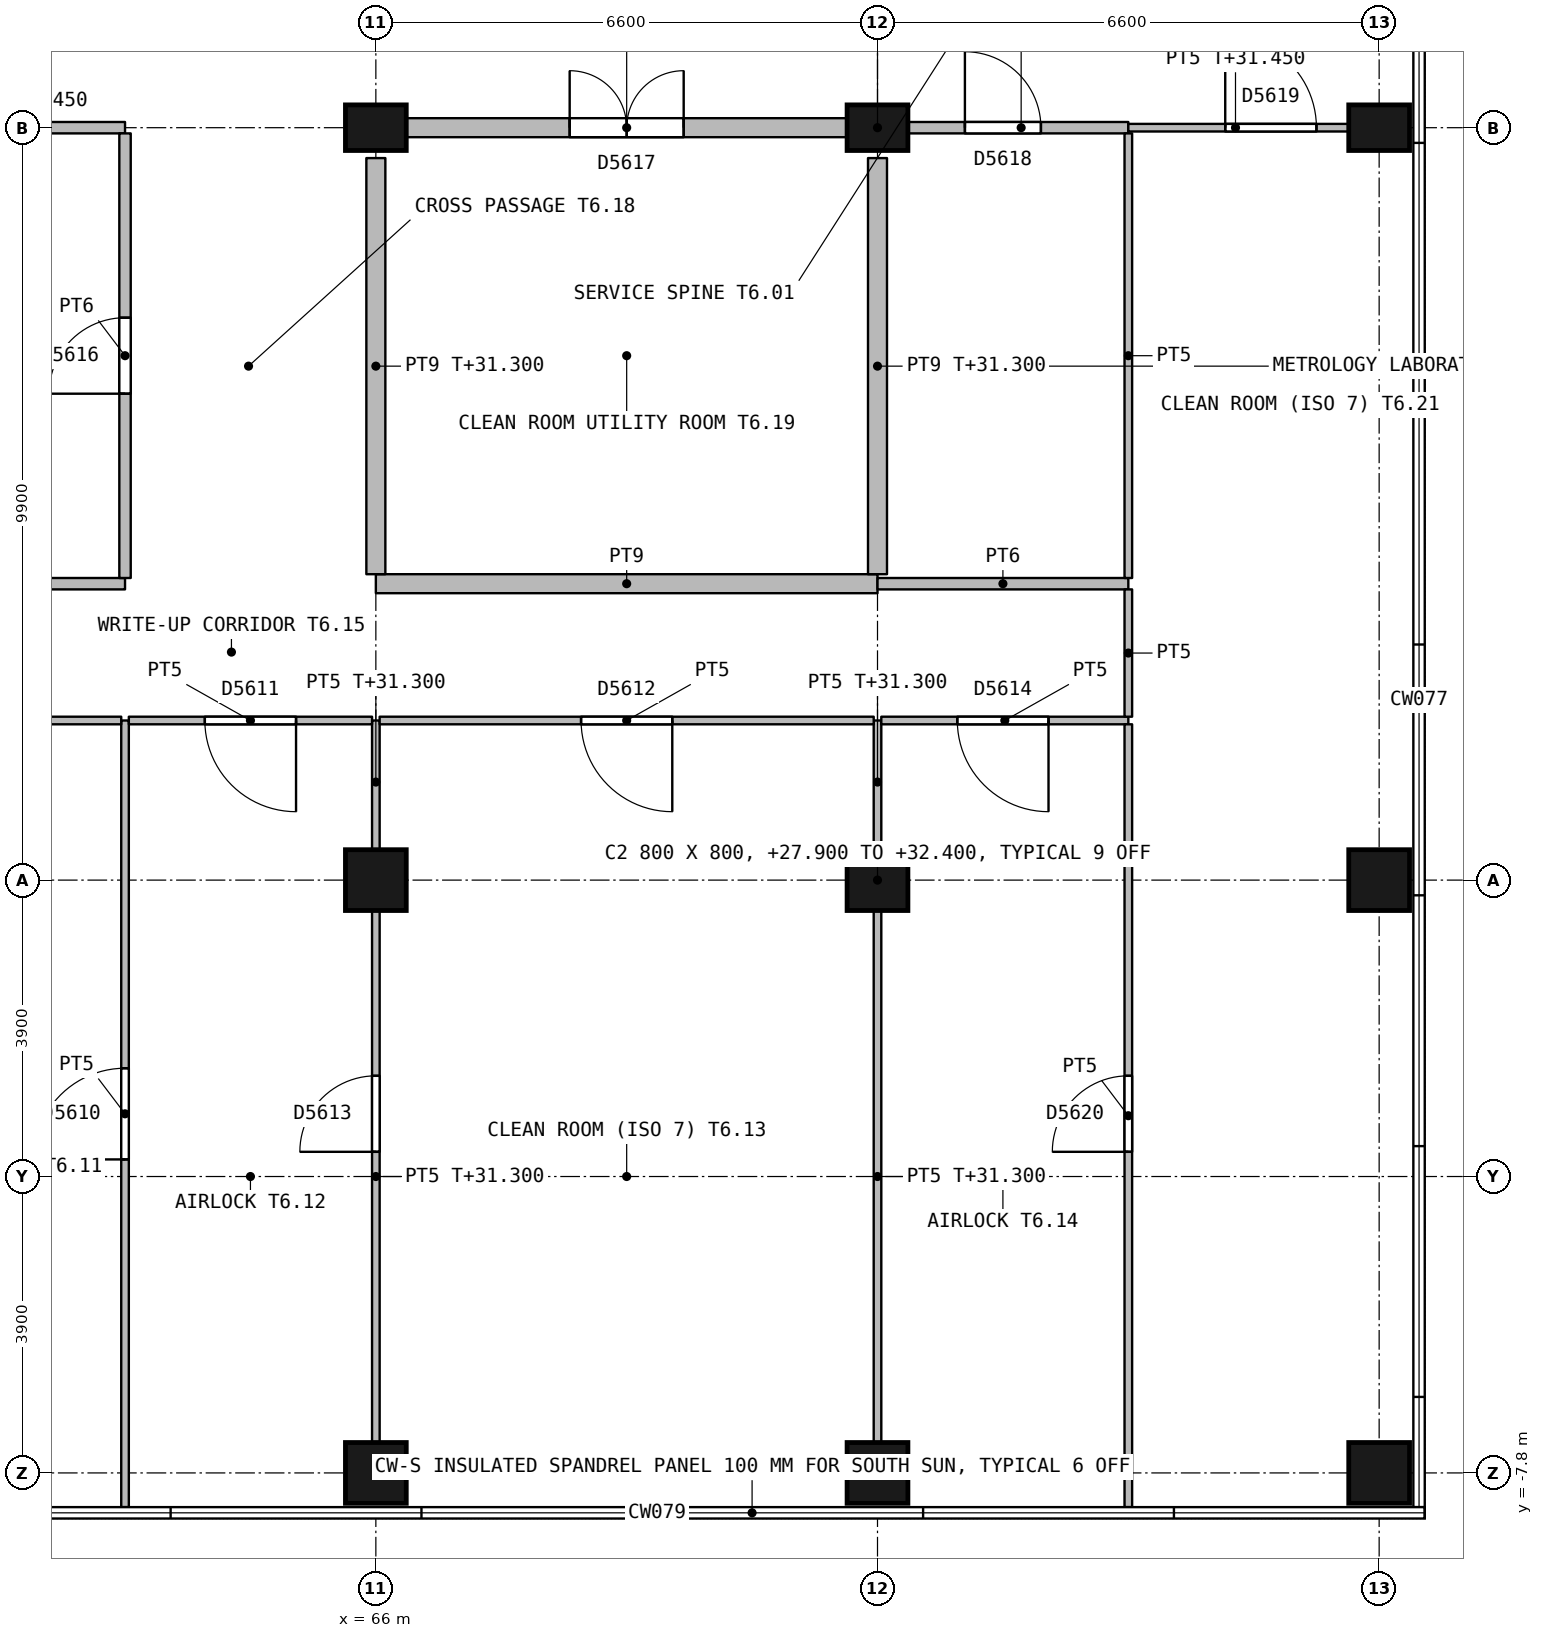
"""IFC4 building model, lengths in metres.
Left out: names, types, materials, properties, quantities, classifications, styles, units other than length and angle.
Written with IfcOpenShell. Run it as: python <this file> out.ifc"""

import sys

from ifc_helpers import new_model, si_unit, direction, frame, frame_2d, origin, origin_2d, place, context, subcontext, project, spatial, rectangle, extrude, element, fill, save


model = new_model("IFC4")
c1 = context("Model", 3, precision=1e-05, world=origin(), true_north=direction((0.0, 1.0)))
c2 = subcontext(c1, "Body", "Model", "MODEL_VIEW")
j1 = project(units=[si_unit("LENGTHUNIT", "METRE"), si_unit("PLANEANGLEUNIT", "RADIAN")], contexts=[c1])
p1 = place(None, origin())
s1 = spatial("IfcSite", under=j1, at=p1, CompositionType="ELEMENT")
p2 = place(p1, origin())
s2 = spatial("IfcBuilding", under=s1, at=p2, CompositionType="ELEMENT")
p3 = place(p2, frame((0.0, 0.0, 27.9)))
s3 = spatial("IfcBuildingStorey", under=s2, at=p3, CompositionType="ELEMENT", Elevation=27.9)
for number, where, z_axis, x_axis in (
    (1, (66.0, -7.8, 0.0), (0.0, 0.0, 1.0), (1.0, 0.0, 0.0)),
    (2, (66.0, 0.0, 0.0), (0.0, 0.0, 1.0), (1.0, 0.0, 0.0)),
):
    element("IfcColumn", number, at=place(p3, frame(where, z_axis=z_axis, x_axis=x_axis)), inside=s3, PredefinedType="COLUMN", context=c2, shape_type="SweptSolid", body=[
        extrude(rectangle(XDim=0.8, YDim=0.8, at=origin_2d()), origin(), (0.0, 0.0, 1.0), 4.5),
    ])
p4 = place(p3, frame((66.0, 9.9, 0.0), z_axis=(0.0, 0.0, 1.0), x_axis=(1.0, 0.0, 0.0)))
e3 = element("IfcColumn", 3, at=p4, inside=s3, PredefinedType="COLUMN", context=c2, shape_type="SweptSolid", body=[
    extrude(rectangle(XDim=0.8, YDim=0.6, at=origin_2d()), origin(), (0.0, 0.0, 1.0), 4.5),
])
for number, where, z_axis, x_axis in (
    (4, (72.6, -7.8, 0.0), (0.0, 0.0, 1.0), (1.0, 0.0, 0.0)),
    (5, (72.6, 0.0, 0.0), (0.0, 0.0, 1.0), (1.0, 0.0, 0.0)),
):
    element("IfcColumn", number, at=place(p3, frame(where, z_axis=z_axis, x_axis=x_axis)), inside=s3, PredefinedType="COLUMN", context=c2, shape_type="SweptSolid", body=[
        extrude(rectangle(XDim=0.8, YDim=0.8, at=origin_2d()), origin(), (0.0, 0.0, 1.0), 4.5),
    ])
p5 = place(p3, frame((72.6, 9.9, 0.0), z_axis=(0.0, 0.0, 1.0), x_axis=(1.0, 0.0, 0.0)))
e6 = element("IfcColumn", 6, at=p5, inside=s3, PredefinedType="COLUMN", context=c2, shape_type="SweptSolid", body=[
    extrude(rectangle(XDim=0.8, YDim=0.6, at=origin_2d()), origin(), (0.0, 0.0, 1.0), 4.5),
])
for number, where, z_axis, x_axis in (
    (7, (79.2, -7.8, 0.0), (0.0, 0.0, 1.0), (1.0, 0.0, 0.0)),
    (8, (79.2, 0.0, 0.0), (0.0, 0.0, 1.0), (1.0, 0.0, 0.0)),
):
    element("IfcColumn", number, at=place(p3, frame(where, z_axis=z_axis, x_axis=x_axis)), inside=s3, PredefinedType="COLUMN", context=c2, shape_type="SweptSolid", body=[
        extrude(rectangle(XDim=0.8, YDim=0.8, at=origin_2d()), origin(), (0.0, 0.0, 1.0), 4.5),
    ])
p6 = place(p3, frame((79.2, 9.9, 0.0), z_axis=(0.0, 0.0, 1.0), x_axis=(1.0, 0.0, 0.0)))
e9 = element("IfcColumn", 9, at=p6, inside=s3, PredefinedType="COLUMN", context=c2, shape_type="SweptSolid", body=[
    extrude(rectangle(XDim=0.8, YDim=0.6, at=origin_2d()), origin(), (0.0, 0.0, 1.0), 4.5),
])
p7 = place(p3, frame((59.8, 9.9, 0.0), z_axis=(0.0, 0.0, 1.0), x_axis=(1.0, 0.0, 0.0)))
e10 = element("IfcWall", 10, at=p7, inside=s3, PredefinedType="PARTITIONING", context=c2, shape_type="SweptSolid", body=[
    extrude(rectangle(XDim=2.9, YDim=0.15, at=frame_2d((1.45, 0.0))), origin(), (0.0, 0.0, 1.0), 3.55),
])
p8 = place(p3, frame((66.4, 9.9, 0.0), z_axis=(0.0, 0.0, 1.0), x_axis=(1.0, 0.0, 0.0)))
e11 = element("IfcWall", 11, at=p8, inside=s3, PredefinedType="PARTITIONING", context=c2, shape_type="SweptSolid", body=[
    extrude(rectangle(XDim=5.8, YDim=0.25, at=frame_2d((2.9, 0.0))), origin(), (0.0, 0.0, 1.0), 3.55),
])
p9 = place(p8, frame((2.15, 0.0, 0.0)))
e12 = element("IfcOpeningElement", 12, at=p9, cuts=e11, PredefinedType="OPENING", context=c2, shape_type="SweptSolid", body=[
    extrude(rectangle(XDim=1.5, YDim=2.1, at=frame_2d((0.75, 1.05))), frame((0.0, 0.135, 0.0), z_axis=(0.0, -1.0, 0.0), x_axis=(1.0, 0.0, 0.0)), (0.0, 0.0, 1.0), 0.27),
])
p10 = place(p3, frame((73.0, 9.9, 0.0), z_axis=(0.0, 0.0, 1.0), x_axis=(1.0, 0.0, 0.0)))
e13 = element("IfcWall", 13, at=p10, inside=s3, PredefinedType="PARTITIONING", context=c2, shape_type="SweptSolid", body=[
    extrude(rectangle(XDim=2.9, YDim=0.15, at=frame_2d((1.45, 0.0))), origin(), (0.0, 0.0, 1.0), 3.55),
])
p11 = place(p10, frame((0.75, 0.0, 0.0)))
e14 = element("IfcOpeningElement", 14, at=p11, cuts=e13, PredefinedType="OPENING", context=c2, shape_type="SweptSolid", body=[
    extrude(rectangle(XDim=1.0, YDim=2.1, at=frame_2d((0.5, 1.05))), frame((0.0, 0.085, 0.0), z_axis=(0.0, -1.0, 0.0), x_axis=(1.0, 0.0, 0.0)), (0.0, 0.0, 1.0), 0.17),
])
p12 = place(p3, frame((78.8, 9.9, 0.0), z_axis=(0.0, 0.0, 1.0), x_axis=(-1.0, 0.0, 0.0)))
e15 = element("IfcWall", 15, at=p12, inside=s3, PredefinedType="PARTITIONING", context=c2, shape_type="SweptSolid", body=[
    extrude(rectangle(XDim=2.9, YDim=0.1, at=frame_2d((1.45, 0.0))), origin(), (0.0, 0.0, 1.0), 3.55),
])
p13 = place(p12, frame((0.425, 0.0, 0.0)))
e16 = element("IfcOpeningElement", 16, at=p13, cuts=e15, PredefinedType="OPENING", context=c2, shape_type="SweptSolid", body=[
    extrude(rectangle(XDim=1.2, YDim=2.1, at=frame_2d((0.6, 1.05))), frame((0.0, 0.06, 0.0), z_axis=(0.0, -1.0, 0.0), x_axis=(1.0, 0.0, 0.0)), (0.0, 0.0, 1.0), 0.12),
])
p14 = place(p3, frame((62.7, 2.1, 0.0), z_axis=(0.0, 0.0, 1.0), x_axis=(0.0, -1.0, 0.0)))
e17 = element("IfcWall", 17, at=p14, inside=s3, PredefinedType="PARTITIONING", context=c2, shape_type="SweptSolid", body=[
    extrude(rectangle(XDim=10.35, YDim=0.1, at=frame_2d((5.175, 0.0))), origin(), (0.0, 0.0, 1.0), 4.2),
])
p15 = place(p14, frame((4.575, 0.0, 0.0)))
e18 = element("IfcOpeningElement", 18, at=p15, cuts=e17, PredefinedType="OPENING", context=c2, shape_type="SweptSolid", body=[
    extrude(rectangle(XDim=1.2, YDim=2.1, at=frame_2d((0.6, 1.05))), frame((0.0, 0.06, 0.0), z_axis=(0.0, -1.0, 0.0), x_axis=(1.0, 0.0, 0.0)), (0.0, 0.0, 1.0), 0.12),
])
p16 = place(p3, frame((62.65, 2.1, 0.0), z_axis=(0.0, 0.0, 1.0), x_axis=(-1.0, 0.0, 0.0)))
e19 = element("IfcWall", 19, at=p16, inside=s3, PredefinedType="PARTITIONING", context=c2, shape_type="SweptSolid", body=[
    extrude(rectangle(XDim=3.25, YDim=0.1, at=frame_2d((1.625, 0.0))), origin(), (0.0, 0.0, 1.0), 4.2),
])
p17 = place(p16, frame((1.1, 0.0, 0.0)))
e20 = element("IfcOpeningElement", 20, at=p17, cuts=e19, PredefinedType="OPENING", context=c2, shape_type="SweptSolid", body=[
    extrude(rectangle(XDim=1.0, YDim=2.1, at=frame_2d((0.5, 1.05))), frame((0.0, 0.06, 0.0), z_axis=(0.0, -1.0, 0.0), x_axis=(1.0, 0.0, 0.0)), (0.0, 0.0, 1.0), 0.12),
])
p18 = place(p3, frame((66.0, -0.4, 0.0), z_axis=(0.0, 0.0, 1.0), x_axis=(0.0, -1.0, 0.0)))
e21 = element("IfcWall", 21, at=p18, inside=s3, PredefinedType="PARTITIONING", context=c2, shape_type="SweptSolid", body=[
    extrude(rectangle(XDim=7.0, YDim=0.1, at=frame_2d((3.5, 0.0))), origin(), (0.0, 0.0, 1.0), 3.4),
])
p19 = place(p18, frame((2.175, 0.0, 0.0)))
e22 = element("IfcOpeningElement", 22, at=p19, cuts=e21, PredefinedType="OPENING", context=c2, shape_type="SweptSolid", body=[
    extrude(rectangle(XDim=1.0, YDim=2.1, at=frame_2d((0.5, 1.05))), frame((0.0, 0.06, 0.0), z_axis=(0.0, -1.0, 0.0), x_axis=(1.0, 0.0, 0.0)), (0.0, 0.0, 1.0), 0.12),
])
p20 = place(p3, frame((66.0, 0.4, 0.0), z_axis=(0.0, 0.0, 1.0), x_axis=(0.0, 1.0, 0.0)))
e23 = element("IfcWall", 23, at=p20, inside=s3, PredefinedType="PARTITIONING", context=c2, shape_type="SweptSolid", body=[
    extrude(rectangle(XDim=1.7, YDim=0.1, at=frame_2d((0.85, 0.0))), origin(), (0.0, 0.0, 1.0), 3.4),
])
p21 = place(p3, frame((65.95, 2.1, 0.0), z_axis=(0.0, 0.0, 1.0), x_axis=(-1.0, 0.0, 0.0)))
e24 = element("IfcWall", 24, at=p21, inside=s3, PredefinedType="PARTITIONING", context=c2, shape_type="SweptSolid", body=[
    extrude(rectangle(XDim=3.2, YDim=0.1, at=frame_2d((1.6, 0.0))), origin(), (0.0, 0.0, 1.0), 4.2),
])
p22 = place(p21, frame((1.0, 0.0, 0.0)))
e25 = element("IfcOpeningElement", 25, at=p22, cuts=e24, PredefinedType="OPENING", context=c2, shape_type="SweptSolid", body=[
    extrude(rectangle(XDim=1.2, YDim=2.1, at=frame_2d((0.6, 1.05))), frame((0.0, 0.06, 0.0), z_axis=(0.0, -1.0, 0.0), x_axis=(1.0, 0.0, 0.0)), (0.0, 0.0, 1.0), 0.12),
])
p23 = place(p3, frame((72.6, -7.4, 0.0), z_axis=(0.0, 0.0, 1.0), x_axis=(0.0, 1.0, 0.0)))
e26 = element("IfcWall", 26, at=p23, inside=s3, PredefinedType="PARTITIONING", context=c2, shape_type="SweptSolid", body=[
    extrude(rectangle(XDim=7.0, YDim=0.1, at=frame_2d((3.5, 0.0))), origin(), (0.0, 0.0, 1.0), 3.4),
])
p24 = place(p3, frame((72.6, 0.4, 0.0), z_axis=(0.0, 0.0, 1.0), x_axis=(0.0, 1.0, 0.0)))
e27 = element("IfcWall", 27, at=p24, inside=s3, PredefinedType="PARTITIONING", context=c2, shape_type="SweptSolid", body=[
    extrude(rectangle(XDim=1.7, YDim=0.1, at=frame_2d((0.85, 0.0))), origin(), (0.0, 0.0, 1.0), 3.4),
])
p25 = place(p3, frame((72.55, 2.1, 0.0), z_axis=(0.0, 0.0, 1.0), x_axis=(-1.0, 0.0, 0.0)))
e28 = element("IfcWall", 28, at=p25, inside=s3, PredefinedType="PARTITIONING", context=c2, shape_type="SweptSolid", body=[
    extrude(rectangle(XDim=6.5, YDim=0.1, at=frame_2d((3.25, 0.0))), origin(), (0.0, 0.0, 1.0), 4.2),
])
p26 = place(p25, frame((2.65, 0.0, 0.0)))
e29 = element("IfcOpeningElement", 29, at=p26, cuts=e28, PredefinedType="OPENING", context=c2, shape_type="SweptSolid", body=[
    extrude(rectangle(XDim=1.2, YDim=2.1, at=frame_2d((0.6, 1.05))), frame((0.0, 0.06, 0.0), z_axis=(0.0, -1.0, 0.0), x_axis=(1.0, 0.0, 0.0)), (0.0, 0.0, 1.0), 0.12),
])
p27 = place(p3, frame((75.9, 2.1, 0.0), z_axis=(0.0, 0.0, 1.0), x_axis=(-1.0, 0.0, 0.0)))
e30 = element("IfcWall", 30, at=p27, inside=s3, PredefinedType="PARTITIONING", context=c2, shape_type="SweptSolid", body=[
    extrude(rectangle(XDim=3.25, YDim=0.1, at=frame_2d((1.625, 0.0))), origin(), (0.0, 0.0, 1.0), 4.2),
])
p28 = place(p27, frame((1.05, 0.0, 0.0)))
e31 = element("IfcOpeningElement", 31, at=p28, cuts=e30, PredefinedType="OPENING", context=c2, shape_type="SweptSolid", body=[
    extrude(rectangle(XDim=1.2, YDim=2.1, at=frame_2d((0.6, 1.05))), frame((0.0, 0.06, 0.0), z_axis=(0.0, -1.0, 0.0), x_axis=(1.0, 0.0, 0.0)), (0.0, 0.0, 1.0), 0.12),
])
p29 = place(p3, frame((75.9, 2.05, 0.0), z_axis=(0.0, 0.0, 1.0), x_axis=(0.0, -1.0, 0.0)))
e32 = element("IfcWall", 32, at=p29, inside=s3, PredefinedType="PARTITIONING", context=c2, shape_type="SweptSolid", body=[
    extrude(rectangle(XDim=10.3, YDim=0.1, at=frame_2d((5.15, 0.0))), origin(), (0.0, 0.0, 1.0), 4.2),
])
p30 = place(p29, frame((4.625, 0.0, 0.0)))
e33 = element("IfcOpeningElement", 33, at=p30, cuts=e32, PredefinedType="OPENING", context=c2, shape_type="SweptSolid", body=[
    extrude(rectangle(XDim=1.0, YDim=2.1, at=frame_2d((0.5, 1.05))), frame((0.0, 0.06, 0.0), z_axis=(0.0, -1.0, 0.0), x_axis=(1.0, 0.0, 0.0)), (0.0, 0.0, 1.0), 0.12),
])
p31 = place(p3, frame((62.7, 3.9, 0.0), z_axis=(0.0, 0.0, 1.0), x_axis=(-1.0, 0.0, 0.0)))
e34 = element("IfcWall", 34, at=p31, inside=s3, PredefinedType="PARTITIONING", context=c2, shape_type="SweptSolid", body=[
    extrude(rectangle(XDim=3.3, YDim=0.15, at=frame_2d((1.65, 0.0))), origin(), (0.0, 0.0, 1.0), 4.2),
])
p32 = place(p3, frame((72.6, 3.9, 0.0), z_axis=(0.0, 0.0, 1.0), x_axis=(-1.0, 0.0, 0.0)))
e35 = element("IfcWall", 35, at=p32, inside=s3, PredefinedType="PARTITIONING", context=c2, shape_type="SweptSolid", body=[
    extrude(rectangle(XDim=6.6, YDim=0.25, at=frame_2d((3.3, 0.0))), origin(), (0.0, 0.0, 1.0), 4.2),
])
p33 = place(p3, frame((75.9, 3.9, 0.0), z_axis=(0.0, 0.0, 1.0), x_axis=(-1.0, 0.0, 0.0)))
e36 = element("IfcWall", 36, at=p33, inside=s3, PredefinedType="PARTITIONING", context=c2, shape_type="SweptSolid", body=[
    extrude(rectangle(XDim=3.3, YDim=0.15, at=frame_2d((1.65, 0.0))), origin(), (0.0, 0.0, 1.0), 4.2),
])
p34 = place(p3, frame((75.9, 2.15, 0.0), z_axis=(0.0, 0.0, 1.0), x_axis=(0.0, 1.0, 0.0)))
e37 = element("IfcWall", 37, at=p34, inside=s3, PredefinedType="PARTITIONING", context=c2, shape_type="SweptSolid", body=[
    extrude(rectangle(XDim=1.675, YDim=0.1, at=frame_2d((0.837, 0.0))), origin(), (0.0, 0.0, 1.0), 4.2),
])
p35 = place(p3, frame((62.7, 9.825, 0.0), z_axis=(0.0, 0.0, 1.0), x_axis=(0.0, -1.0, 0.0)))
e38 = element("IfcWall", 38, at=p35, inside=s3, PredefinedType="PARTITIONING", context=c2, shape_type="SweptSolid", body=[
    extrude(rectangle(XDim=5.85, YDim=0.15, at=frame_2d((2.925, 0.0))), origin(), (0.0, 0.0, 1.0), 4.2),
])
p36 = place(p35, frame((2.425, 0.0, 0.0)))
e39 = element("IfcOpeningElement", 39, at=p36, cuts=e38, PredefinedType="OPENING", context=c2, shape_type="SweptSolid", body=[
    extrude(rectangle(XDim=1.0, YDim=2.1, at=frame_2d((0.5, 1.05))), frame((0.0, 0.085, 0.0), z_axis=(0.0, -1.0, 0.0), x_axis=(1.0, 0.0, 0.0)), (0.0, 0.0, 1.0), 0.17),
])
for number, where, z_axis, x_axis in (
    (40, (66.0, 4.025, 0.0), (0.0, 0.0, 1.0), (0.0, 1.0, 0.0)),
    (41, (72.6, 4.025, 0.0), (0.0, 0.0, 1.0), (0.0, 1.0, 0.0)),
):
    element("IfcWall", number, at=place(p3, frame(where, z_axis=z_axis, x_axis=x_axis)), inside=s3, PredefinedType="PARTITIONING", context=c2, shape_type="SweptSolid", body=[
        extrude(rectangle(XDim=5.475, YDim=0.25, at=frame_2d((2.738, 0.0))), origin(), (0.0, 0.0, 1.0), 3.4),
    ])
p37 = place(p3, frame((75.9, 3.975, 0.0), z_axis=(0.0, 0.0, 1.0), x_axis=(0.0, 1.0, 0.0)))
e42 = element("IfcWall", 42, at=p37, inside=s3, PredefinedType="PARTITIONING", context=c2, shape_type="SweptSolid", body=[
    extrude(rectangle(XDim=5.85, YDim=0.1, at=frame_2d((2.925, 0.0))), origin(), (0.0, 0.0, 1.0), 4.2),
])
p38 = place(p15, origin())
e43 = element("IfcDoor", 43, at=p38, inside=s3, OperationType="SINGLE_SWING_RIGHT", PredefinedType="DOOR", context=c2, shape_type="SweptSolid", body=[
    extrude(rectangle(XDim=1.2, YDim=2.1, at=frame_2d((0.6, 1.05))), frame((0.0, 0.027, 0.0), z_axis=(0.0, -1.0, 0.0), x_axis=(1.0, 0.0, 0.0)), (0.0, 0.0, 1.0), 0.054),
])
fill(e18, e43)
p39 = place(p22, origin())
e44 = element("IfcDoor", 44, at=p39, inside=s3, OperationType="SINGLE_SWING_LEFT", PredefinedType="DOOR", context=c2, shape_type="SweptSolid", body=[
    extrude(rectangle(XDim=1.2, YDim=2.1, at=frame_2d((0.6, 1.05))), frame((0.0, 0.027, 0.0), z_axis=(0.0, -1.0, 0.0), x_axis=(1.0, 0.0, 0.0)), (0.0, 0.0, 1.0), 0.054),
])
fill(e25, e44)
p40 = place(p26, origin())
e45 = element("IfcDoor", 45, at=p40, inside=s3, OperationType="SINGLE_SWING_LEFT", PredefinedType="DOOR", context=c2, shape_type="SweptSolid", body=[
    extrude(rectangle(XDim=1.2, YDim=2.1, at=frame_2d((0.6, 1.05))), frame((0.0, 0.03, 0.0), z_axis=(0.0, -1.0, 0.0), x_axis=(1.0, 0.0, 0.0)), (0.0, 0.0, 1.0), 0.06),
])
fill(e29, e45)
p41 = place(p19, origin())
e46 = element("IfcDoor", 46, at=p41, inside=s3, OperationType="SINGLE_SWING_RIGHT", PredefinedType="DOOR", context=c2, shape_type="SweptSolid", body=[
    extrude(rectangle(XDim=1.0, YDim=2.1, at=frame_2d((0.5, 1.05))), frame((0.0, 0.027, 0.0), z_axis=(0.0, -1.0, 0.0), x_axis=(1.0, 0.0, 0.0)), (0.0, 0.0, 1.0), 0.054),
])
fill(e22, e46)
p42 = place(p28, origin())
e47 = element("IfcDoor", 47, at=p42, inside=s3, OperationType="SINGLE_SWING_LEFT", PredefinedType="DOOR", context=c2, shape_type="SweptSolid", body=[
    extrude(rectangle(XDim=1.2, YDim=2.1, at=frame_2d((0.6, 1.05))), frame((0.0, 0.027, 0.0), z_axis=(0.0, -1.0, 0.0), x_axis=(1.0, 0.0, 0.0)), (0.0, 0.0, 1.0), 0.054),
])
fill(e31, e47)
p43 = place(p36, origin())
e48 = element("IfcDoor", 48, at=p43, inside=s3, OperationType="SINGLE_SWING_RIGHT", PredefinedType="DOOR", context=c2, shape_type="SweptSolid", body=[
    extrude(rectangle(XDim=1.0, YDim=2.1, at=frame_2d((0.5, 1.05))), frame((0.0, 0.027, 0.0), z_axis=(0.0, -1.0, 0.0), x_axis=(1.0, 0.0, 0.0)), (0.0, 0.0, 1.0), 0.054),
])
fill(e39, e48)
p44 = place(p9, origin())
e49 = element("IfcDoor", 49, at=p44, inside=s3, OperationType="DOUBLE_DOOR_SINGLE_SWING", PredefinedType="DOOR", context=c2, shape_type="SweptSolid", body=[
    extrude(rectangle(XDim=1.5, YDim=2.1, at=frame_2d((0.75, 1.05))), frame((0.0, 0.03, 0.0), z_axis=(0.0, -1.0, 0.0), x_axis=(1.0, 0.0, 0.0)), (0.0, 0.0, 1.0), 0.06),
])
fill(e12, e49)
p45 = place(p11, origin())
e50 = element("IfcDoor", 50, at=p45, inside=s3, OperationType="SINGLE_SWING_LEFT", PredefinedType="DOOR", context=c2, shape_type="SweptSolid", body=[
    extrude(rectangle(XDim=1.0, YDim=2.1, at=frame_2d((0.5, 1.05))), frame((0.0, 0.027, 0.0), z_axis=(0.0, -1.0, 0.0), x_axis=(1.0, 0.0, 0.0)), (0.0, 0.0, 1.0), 0.054),
])
fill(e14, e50)
p46 = place(p13, origin())
e51 = element("IfcDoor", 51, at=p46, inside=s3, OperationType="SINGLE_SWING_RIGHT", PredefinedType="DOOR", context=c2, shape_type="SweptSolid", body=[
    extrude(rectangle(XDim=1.2, YDim=2.1, at=frame_2d((0.6, 1.05))), frame((0.0, 0.03, 0.0), z_axis=(0.0, -1.0, 0.0), x_axis=(1.0, 0.0, 0.0)), (0.0, 0.0, 1.0), 0.06),
])
fill(e16, e51)
p47 = place(p30, origin())
e52 = element("IfcDoor", 52, at=p47, inside=s3, OperationType="SINGLE_SWING_RIGHT", PredefinedType="DOOR", context=c2, shape_type="SweptSolid", body=[
    extrude(rectangle(XDim=1.0, YDim=2.1, at=frame_2d((0.5, 1.05))), frame((0.0, 0.027, 0.0), z_axis=(0.0, -1.0, 0.0), x_axis=(1.0, 0.0, 0.0)), (0.0, 0.0, 1.0), 0.054),
])
fill(e33, e52)
save(model, sys.argv[1])
